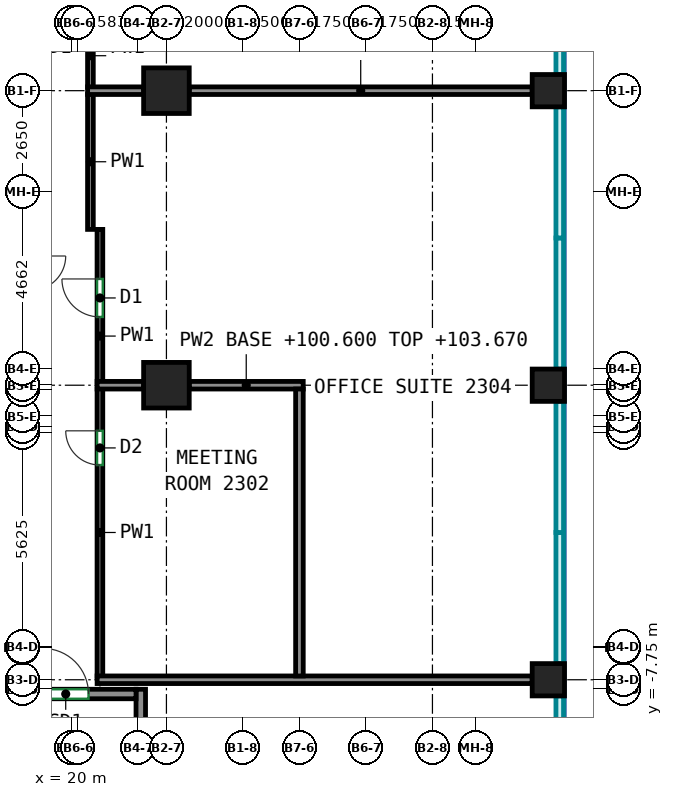
"""IFC4 building model, lengths in metres.
Left out: names, types, materials, properties, quantities, classifications, styles, units other than length and angle.
Written with IfcOpenShell. Run it as: python <this file> out.ifc"""

import sys

from ifc_helpers import new_model, si_unit, direction, frame, frame_2d, origin, origin_2d, place, context, subcontext, project, spatial, rectangle, extrude, source, transform, mapped, element, fill, save


model = new_model("IFC4")
c1 = context("Model", 3, precision=1e-05, world=origin(), true_north=direction((0.0, 1.0)))
c2 = subcontext(c1, "Body", "Model", "MODEL_VIEW")
j1 = project(units=[si_unit("LENGTHUNIT", "METRE"), si_unit("PLANEANGLEUNIT", "RADIAN")], contexts=[c1])
p1 = place(None, origin())
s1 = spatial("IfcSite", under=j1, at=p1, CompositionType="ELEMENT")
p2 = place(p1, origin())
s2 = spatial("IfcBuilding", under=s1, at=p2, CompositionType="ELEMENT")
p3 = place(p2, frame((0.0, 0.0, 100.6)))
s3 = spatial("IfcBuildingStorey", under=s2, at=p3, CompositionType="ELEMENT", Elevation=100.6)
m1 = source(origin(), c2, "Body", "SweptSolid", [
    extrude(rectangle(XDim=1.2, YDim=1.2, at=origin_2d()), origin(), (0.0, 0.0, 1.0), 3.72),
])
for number, where, z_axis, x_axis in (
    (1, (22.5, 0.25, 0.0), (0.0, 0.0, 1.0), (1.0, 0.0, 0.0)),
    (2, (22.5, 8.0, 0.0), (0.0, 0.0, 1.0), (1.0, 0.0, 0.0)),
):
    element("IfcColumn", number, at=place(p3, frame(where, z_axis=z_axis, x_axis=x_axis)), inside=s3, PredefinedType="COLUMN", context=c2, shape_type="MappedRepresentation", body=[
        mapped(m1, transform((0.0, 0.0, 0.0))),
    ])
m2 = source(origin(), c2, "Body", "SweptSolid", [
    extrude(rectangle(XDim=0.85, YDim=0.85, at=origin_2d()), origin(), (0.0, 0.0, 1.0), 3.72),
])
for number, where, z_axis, x_axis in (
    (3, (32.55, -7.5, 0.0), (0.0, 0.0, 1.0), (1.0, 0.0, 0.0)),
    (4, (32.55, 0.25, 0.0), (0.0, 0.0, 1.0), (1.0, 0.0, 0.0)),
    (5, (32.55, 8.0, 0.0), (0.0, 0.0, 1.0), (1.0, 0.0, 0.0)),
):
    element("IfcColumn", number, at=place(p3, frame(where, z_axis=z_axis, x_axis=x_axis)), inside=s3, PredefinedType="COLUMN", context=c2, shape_type="MappedRepresentation", body=[
        mapped(m2, transform((0.0, 0.0, 0.0))),
    ])
m3 = source(origin(), c2, "Body", "SweptSolid", [
    extrude(rectangle(XDim=8.0, YDim=0.25, at=frame_2d((4.0, 0.0))), origin(), (0.0, 0.0, 1.0), 3.72),
])
p4 = place(p3, frame((21.825, -15.75, 0.0), z_axis=(0.0, 0.0, 1.0), x_axis=(0.0, 1.0, 0.0)))
e6 = element("IfcWall", 6, at=p4, inside=s3, PredefinedType="SHEAR", context=c2, shape_type="MappedRepresentation", body=[
    mapped(m3, transform((0.0, 0.0, 0.0))),
])
m4 = source(origin(), c2, "Body", "SweptSolid", [
    extrude(rectangle(XDim=3.7, YDim=0.25, at=frame_2d((1.85, 0.0))), origin(), (0.0, 0.0, 1.0), 3.72),
])
p5 = place(p3, frame((18.0, -7.875, 0.0), z_axis=(0.0, 0.0, 1.0), x_axis=(1.0, 0.0, 0.0)))
e7 = element("IfcWall", 7, at=p5, inside=s3, PredefinedType="SHEAR", context=c2, shape_type="MappedRepresentation", body=[
    mapped(m4, transform((0.0, 0.0, 0.0))),
])
p6 = place(p5, frame((1.25, 0.0, 0.0)))
e8 = element("IfcOpeningElement", 8, at=p6, cuts=e7, PredefinedType="OPENING", context=c2, shape_type="SweptSolid", body=[
    extrude(rectangle(XDim=1.2, YDim=2.1, at=frame_2d((0.6, 1.05))), frame((0.0, 0.135, 0.0), z_axis=(0.0, -1.0, 0.0), x_axis=(1.0, 0.0, 0.0)), (0.0, 0.0, 1.0), 0.27),
])
p7 = place(p3, frame((20.75, -7.41, 0.0), z_axis=(0.0, 0.0, 1.0), x_axis=(0.0, 1.0, 0.0)))
e9 = element("IfcWall", 9, at=p7, inside=s3, PredefinedType="PARTITIONING", context=c2, shape_type="SweptSolid", body=[
    extrude(rectangle(XDim=7.57, YDim=0.15, at=frame_2d((3.785, 0.0))), origin(), (0.0, 0.0, 1.0), 3.72),
])
p8 = place(p7, frame((5.56, 0.0, 0.0)))
e10 = element("IfcOpeningElement", 10, at=p8, cuts=e9, PredefinedType="OPENING", context=c2, shape_type="SweptSolid", body=[
    extrude(rectangle(XDim=0.9, YDim=2.1, at=frame_2d((0.45, 1.05))), frame((0.0, 0.085, 0.0), z_axis=(0.0, -1.0, 0.0), x_axis=(1.0, 0.0, 0.0)), (0.0, 0.0, 1.0), 0.17),
])
p9 = place(p3, frame((20.5, 4.35, 0.0), z_axis=(0.0, 0.0, 1.0), x_axis=(0.0, 1.0, 0.0)))
e11 = element("IfcWall", 11, at=p9, inside=s3, PredefinedType="PARTITIONING", context=c2, shape_type="SweptSolid", body=[
    extrude(rectangle(XDim=3.56, YDim=0.15, at=frame_2d((1.78, 0.0))), origin(), (0.0, 0.0, 1.0), 3.72),
])
p10 = place(p3, frame((20.75, 0.34, 0.0), z_axis=(0.0, 0.0, 1.0), x_axis=(0.0, 1.0, 0.0)))
e12 = element("IfcWall", 12, at=p10, inside=s3, PredefinedType="PARTITIONING", context=c2, shape_type="SweptSolid", body=[
    extrude(rectangle(XDim=4.01, YDim=0.15, at=frame_2d((2.005, 0.0))), origin(), (0.0, 0.0, 1.0), 3.72),
])
p11 = place(p10, frame((1.706, 0.0, 0.0)))
e13 = element("IfcOpeningElement", 13, at=p11, cuts=e12, PredefinedType="OPENING", context=c2, shape_type="SweptSolid", body=[
    extrude(rectangle(XDim=1.0, YDim=2.1, at=frame_2d((0.5, 1.05))), frame((0.0, 0.085, 0.0), z_axis=(0.0, -1.0, 0.0), x_axis=(1.0, 0.0, 0.0)), (0.0, 0.0, 1.0), 0.17),
])
p12 = place(p3, frame((20.5, 8.09, 0.0), z_axis=(0.0, 0.0, 1.0), x_axis=(0.0, 1.0, 0.0)))
e14 = element("IfcWall", 14, at=p12, inside=s3, PredefinedType="PARTITIONING", context=c2, shape_type="SweptSolid", body=[
    extrude(rectangle(XDim=1.66, YDim=0.15, at=frame_2d((0.83, 0.0))), origin(), (0.0, 0.0, 1.0), 3.72),
])
p13 = place(p3, frame((20.676, -7.5, 0.0), z_axis=(0.0, 0.0, 1.0), x_axis=(1.0, 0.0, 0.0)))
e15 = element("IfcWall", 15, at=p13, inside=s3, PredefinedType="PARTITIONING", context=c2, shape_type="SweptSolid", body=[
    extrude(rectangle(XDim=11.449, YDim=0.2, at=frame_2d((5.725, 0.0))), origin(), (0.0, 0.0, 1.0), 3.72),
])
p14 = place(p3, frame((20.676, 0.25, 0.0), z_axis=(0.0, 0.0, 1.0), x_axis=(1.0, 0.0, 0.0)))
e16 = element("IfcWall", 16, at=p14, inside=s3, PredefinedType="PARTITIONING", context=c2, shape_type="SweptSolid", body=[
    extrude(rectangle(XDim=1.224, YDim=0.2, at=frame_2d((0.612, 0.0))), origin(), (0.0, 0.0, 1.0), 3.72),
])
p15 = place(p3, frame((23.1, 0.25, 0.0), z_axis=(0.0, 0.0, 1.0), x_axis=(1.0, 0.0, 0.0)))
e17 = element("IfcWall", 17, at=p15, inside=s3, PredefinedType="PARTITIONING", context=c2, shape_type="SweptSolid", body=[
    extrude(rectangle(XDim=3.0, YDim=0.2, at=frame_2d((1.5, 0.0))), origin(), (0.0, 0.0, 1.0), 3.07),
])
p16 = place(p3, frame((26.0, -7.4, 0.0), z_axis=(0.0, 0.0, 1.0), x_axis=(0.0, 1.0, 0.0)))
e18 = element("IfcWall", 18, at=p16, inside=s3, PredefinedType="PARTITIONING", context=c2, shape_type="SweptSolid", body=[
    extrude(rectangle(XDim=7.55, YDim=0.2, at=frame_2d((3.775, 0.0))), origin(), (0.0, 0.0, 1.0), 3.72),
])
p17 = place(p3, frame((20.426, 8.0, 0.0), z_axis=(0.0, 0.0, 1.0), x_axis=(1.0, 0.0, 0.0)))
e19 = element("IfcWall", 19, at=p17, inside=s3, PredefinedType="PARTITIONING", context=c2, shape_type="SweptSolid", body=[
    extrude(rectangle(XDim=1.474, YDim=0.2, at=frame_2d((0.737, 0.0))), origin(), (0.0, 0.0, 1.0), 3.72),
])
p18 = place(p3, frame((23.1, 8.0, 0.0), z_axis=(0.0, 0.0, 1.0), x_axis=(1.0, 0.0, 0.0)))
e20 = element("IfcWall", 20, at=p18, inside=s3, PredefinedType="PARTITIONING", context=c2, shape_type="SweptSolid", body=[
    extrude(rectangle(XDim=9.025, YDim=0.2, at=frame_2d((4.512, 0.0))), origin(), (0.0, 0.0, 1.0), 3.07),
])
p19 = place(p6, origin())
e21 = element("IfcDoor", 21, at=p19, inside=s3, OperationType="DOUBLE_DOOR_SINGLE_SWING", PredefinedType="DOOR", context=c2, shape_type="SweptSolid", body=[
    extrude(rectangle(XDim=1.2, YDim=2.1, at=frame_2d((0.6, 1.05))), frame((0.0, 0.025, 0.0), z_axis=(0.0, -1.0, 0.0), x_axis=(1.0, 0.0, 0.0)), (0.0, 0.0, 1.0), 0.05),
])
fill(e8, e21)
p20 = place(p8, origin())
e22 = element("IfcDoor", 22, at=p20, inside=s3, OperationType="SINGLE_SWING_RIGHT", PredefinedType="DOOR", context=c2, shape_type="SweptSolid", body=[
    extrude(rectangle(XDim=0.9, YDim=2.1, at=frame_2d((0.45, 1.05))), frame((0.0, 0.025, 0.0), z_axis=(0.0, -1.0, 0.0), x_axis=(1.0, 0.0, 0.0)), (0.0, 0.0, 1.0), 0.05),
])
fill(e10, e22)
p21 = place(p11, origin())
e23 = element("IfcDoor", 23, at=p21, inside=s3, OperationType="SINGLE_SWING_RIGHT", PredefinedType="DOOR", context=c2, shape_type="SweptSolid", body=[
    extrude(rectangle(XDim=1.0, YDim=2.1, at=frame_2d((0.5, 1.05))), frame((0.0, 0.025, 0.0), z_axis=(0.0, -1.0, 0.0), x_axis=(1.0, 0.0, 0.0)), (0.0, 0.0, 1.0), 0.05),
])
fill(e13, e23)
save(model, sys.argv[1])
